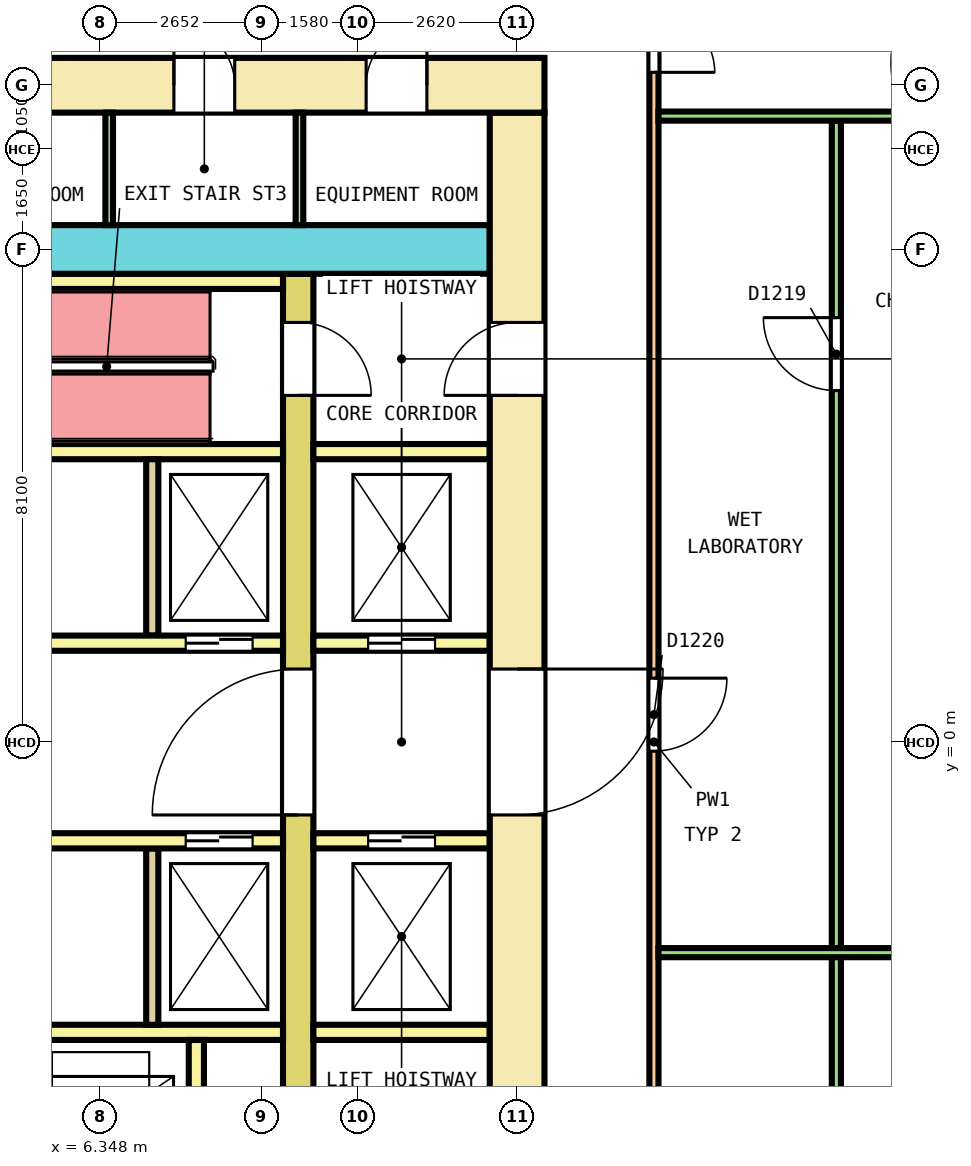
"""IFC4 building model, lengths in metres.
Left out: names, types, materials, properties, quantities, classifications, styles, units other than length and angle.
Written with IfcOpenShell. Run it as: python <this file> out.ifc"""

import sys

from ifc_helpers import new_model, si_unit, direction, frame, frame_2d, origin, place, context, subcontext, project, spatial, rectangle, extrude, element, fill, save


model = new_model("IFC4")
c1 = context("Model", 3, precision=1e-05, world=origin(), true_north=direction((0.0, 1.0)))
c2 = subcontext(c1, "Body", "Model", "MODEL_VIEW")
j1 = project(units=[si_unit("LENGTHUNIT", "METRE"), si_unit("PLANEANGLEUNIT", "RADIAN")], contexts=[c1])
p1 = place(None, origin())
s1 = spatial("IfcSite", under=j1, at=p1, CompositionType="ELEMENT")
p2 = place(p1, origin())
s2 = spatial("IfcBuilding", under=s1, at=p2, CompositionType="ELEMENT")
p3 = place(p2, frame((0.0, 0.0, 14.6)))
s3 = spatial("IfcBuildingStorey", under=s2, at=p3, CompositionType="ELEMENT", Elevation=14.6)
p4 = place(p3, frame((-13.65, 10.8, 0.0), z_axis=(0.0, 0.0, 1.0), x_axis=(1.0, 0.0, 0.0)))
e1 = element("IfcWall", 1, at=p4, inside=s3, PredefinedType="SHEAR", context=c2, shape_type="SweptSolid", body=[
    extrude(rectangle(XDim=27.3, YDim=0.9, at=frame_2d((13.65, 0.0))), origin(), (0.0, 0.0, 1.0), 4.1),
])
p5 = place(p4, frame((1.892, 0.0, 0.0)))
e2 = element("IfcOpeningElement", 2, at=p5, cuts=e1, PredefinedType="OPENING", context=c2, shape_type="SweptSolid", body=[
    extrude(rectangle(XDim=1.0, YDim=2.1, at=frame_2d((0.5, 1.05))), frame((0.0, 0.46, 0.0), z_axis=(0.0, -1.0, 0.0), x_axis=(1.0, 0.0, 0.0)), (0.0, 0.0, 1.0), 0.92),
])
p6 = place(p4, frame((4.97, 0.0, 0.0)))
e3 = element("IfcOpeningElement", 3, at=p6, cuts=e1, PredefinedType="OPENING", context=c2, shape_type="SweptSolid", body=[
    extrude(rectangle(XDim=1.0, YDim=2.1, at=frame_2d((0.5, 1.05))), frame((0.0, 0.46, 0.0), z_axis=(0.0, -1.0, 0.0), x_axis=(1.0, 0.0, 0.0)), (0.0, 0.0, 1.0), 0.92),
])
p7 = place(p4, frame((8.017, 0.0, 0.0)))
e4 = element("IfcOpeningElement", 4, at=p7, cuts=e1, PredefinedType="OPENING", context=c2, shape_type="SweptSolid", body=[
    extrude(rectangle(XDim=1.0, YDim=2.1, at=frame_2d((0.5, 1.05))), frame((0.0, 0.46, 0.0), z_axis=(0.0, -1.0, 0.0), x_axis=(1.0, 0.0, 0.0)), (0.0, 0.0, 1.0), 0.92),
])
p8 = place(p4, frame((11.064, 0.0, 0.0)))
e5 = element("IfcOpeningElement", 5, at=p8, cuts=e1, PredefinedType="OPENING", context=c2, shape_type="SweptSolid", body=[
    extrude(rectangle(XDim=1.0, YDim=2.1, at=frame_2d((0.5, 1.05))), frame((0.0, 0.46, 0.0), z_axis=(0.0, -1.0, 0.0), x_axis=(1.0, 0.0, 0.0)), (0.0, 0.0, 1.0), 0.92),
])
p9 = place(p4, frame((18.077, 0.0, 0.0)))
e6 = element("IfcOpeningElement", 6, at=p9, cuts=e1, PredefinedType="OPENING", context=c2, shape_type="SweptSolid", body=[
    extrude(rectangle(XDim=1.0, YDim=2.1, at=frame_2d((0.5, 1.05))), frame((0.0, 0.46, 0.0), z_axis=(0.0, -1.0, 0.0), x_axis=(1.0, 0.0, 0.0)), (0.0, 0.0, 1.0), 0.92),
])
p10 = place(p4, frame((21.206, 0.0, 0.0)))
e7 = element("IfcOpeningElement", 7, at=p10, cuts=e1, PredefinedType="OPENING", context=c2, shape_type="SweptSolid", body=[
    extrude(rectangle(XDim=1.0, YDim=2.1, at=frame_2d((0.5, 1.05))), frame((0.0, 0.46, 0.0), z_axis=(0.0, -1.0, 0.0), x_axis=(1.0, 0.0, 0.0)), (0.0, 0.0, 1.0), 0.92),
])
p11 = place(p4, frame((24.367, 0.0, 0.0)))
e8 = element("IfcOpeningElement", 8, at=p11, cuts=e1, PredefinedType="OPENING", context=c2, shape_type="SweptSolid", body=[
    extrude(rectangle(XDim=1.0, YDim=2.1, at=frame_2d((0.5, 1.05))), frame((0.0, 0.46, 0.0), z_axis=(0.0, -1.0, 0.0), x_axis=(1.0, 0.0, 0.0)), (0.0, 0.0, 1.0), 0.92),
])
p12 = place(p4, frame((14.575, 0.0, 0.0)))
e9 = element("IfcOpeningElement", 9, at=p12, cuts=e1, PredefinedType="OPENING", context=c2, shape_type="SweptSolid", body=[
    extrude(rectangle(XDim=1.4, YDim=2.1, at=frame_2d((0.7, 1.05))), frame((0.0, 0.46, 0.0), z_axis=(0.0, -1.0, 0.0), x_axis=(1.0, 0.0, 0.0)), (0.0, 0.0, 1.0), 0.92),
])
p13 = place(p3, frame((13.2, -10.35, 0.0), z_axis=(0.0, 0.0, 1.0), x_axis=(0.0, 1.0, 0.0)))
e10 = element("IfcWall", 10, at=p13, inside=s3, PredefinedType="SHEAR", context=c2, shape_type="SweptSolid", body=[
    extrude(rectangle(XDim=20.7, YDim=0.9, at=frame_2d((10.35, 0.0))), origin(), (0.0, 0.0, 1.0), 4.1),
])
p14 = place(p13, frame((9.15, 0.0, 0.0)))
e11 = element("IfcOpeningElement", 11, at=p14, cuts=e10, PredefinedType="OPENING", context=c2, shape_type="SweptSolid", body=[
    extrude(rectangle(XDim=2.4, YDim=2.1, at=frame_2d((1.2, 1.05))), frame((0.0, 0.46, 0.0), z_axis=(0.0, -1.0, 0.0), x_axis=(1.0, 0.0, 0.0)), (0.0, 0.0, 1.0), 0.92),
])
p15 = place(p13, frame((16.05, 0.0, 0.0)))
e12 = element("IfcOpeningElement", 12, at=p15, cuts=e10, PredefinedType="OPENING", context=c2, shape_type="SweptSolid", body=[
    extrude(rectangle(XDim=1.2, YDim=2.1, at=frame_2d((0.6, 1.05))), frame((0.0, 0.46, 0.0), z_axis=(0.0, -1.0, 0.0), x_axis=(1.0, 0.0, 0.0)), (0.0, 0.0, 1.0), 0.92),
])
p16 = place(p13, frame((3.55, 0.0, 0.0)))
e13 = element("IfcOpeningElement", 13, at=p16, cuts=e10, PredefinedType="OPENING", context=c2, shape_type="SweptSolid", body=[
    extrude(rectangle(XDim=1.0, YDim=2.1, at=frame_2d((0.5, 1.05))), frame((0.0, 0.46, 0.0), z_axis=(0.0, -1.0, 0.0), x_axis=(1.0, 0.0, 0.0)), (0.0, 0.0, 1.0), 0.92),
])
p17 = place(p3, frame((-12.75, 8.1, 0.0), z_axis=(0.0, 0.0, 1.0), x_axis=(1.0, 0.0, 0.0)))
e14 = element("IfcWall", 14, at=p17, inside=s3, PredefinedType="SHEAR", context=c2, shape_type="SweptSolid", body=[
    extrude(rectangle(XDim=25.5, YDim=0.8, at=frame_2d((12.75, 0.0))), origin(), (0.0, 0.0, 1.0), 4.1),
])
p18 = place(p17, frame((13.675, 0.0, 0.0)))
e15 = element("IfcOpeningElement", 15, at=p18, cuts=e14, PredefinedType="OPENING", context=c2, shape_type="SweptSolid", body=[
    extrude(rectangle(XDim=1.4, YDim=2.1, at=frame_2d((0.7, 1.05))), frame((0.0, 0.41, 0.0), z_axis=(0.0, -1.0, 0.0), x_axis=(1.0, 0.0, 0.0)), (0.0, 0.0, 1.0), 0.82),
])
p19 = place(p3, frame((9.6, -7.7, 0.0), z_axis=(0.0, 0.0, 1.0), x_axis=(0.0, 1.0, 0.0)))
e16 = element("IfcWall", 16, at=p19, inside=s3, PredefinedType="SHEAR", context=c2, shape_type="SweptSolid", body=[
    extrude(rectangle(XDim=15.4, YDim=0.5, at=frame_2d((7.7, 0.0))), origin(), (0.0, 0.0, 1.0), 4.1),
])
p20 = place(p19, frame((6.5, 0.0, 0.0)))
e17 = element("IfcOpeningElement", 17, at=p20, cuts=e16, PredefinedType="OPENING", context=c2, shape_type="SweptSolid", body=[
    extrude(rectangle(XDim=2.4, YDim=2.1, at=frame_2d((1.2, 1.05))), frame((0.0, 0.26, 0.0), z_axis=(0.0, -1.0, 0.0), x_axis=(1.0, 0.0, 0.0)), (0.0, 0.0, 1.0), 0.52),
])
p21 = place(p19, frame((13.4, 0.0, 0.0)))
e18 = element("IfcOpeningElement", 18, at=p21, cuts=e16, PredefinedType="OPENING", context=c2, shape_type="SweptSolid", body=[
    extrude(rectangle(XDim=1.2, YDim=2.1, at=frame_2d((0.6, 1.05))), frame((0.0, 0.26, 0.0), z_axis=(0.0, -1.0, 0.0), x_axis=(1.0, 0.0, 0.0)), (0.0, 0.0, 1.0), 0.52),
])
p22 = place(p19, frame((0.9, 0.0, 0.0)))
e19 = element("IfcOpeningElement", 19, at=p22, cuts=e16, PredefinedType="OPENING", context=c2, shape_type="SweptSolid", body=[
    extrude(rectangle(XDim=1.0, YDim=2.1, at=frame_2d((0.5, 1.05))), frame((0.0, 0.26, 0.0), z_axis=(0.0, -1.0, 0.0), x_axis=(1.0, 0.0, 0.0)), (0.0, 0.0, 1.0), 0.52),
])
p23 = place(p3, frame((-9.35, 1.625, 0.0), z_axis=(0.0, 0.0, 1.0), x_axis=(1.0, 0.0, 0.0)))
e20 = element("IfcWall", 20, at=p23, inside=s3, PredefinedType="SOLIDWALL", context=c2, shape_type="SweptSolid", body=[
    extrude(rectangle(XDim=18.7, YDim=0.25, at=frame_2d((9.35, 0.0))), origin(), (0.0, 0.0, 1.0), 4.1),
])
p24 = place(p23, frame((0.5, 0.0, 0.0)))
e21 = element("IfcOpeningElement", 21, at=p24, cuts=e20, PredefinedType="OPENING", context=c2, shape_type="SweptSolid", body=[
    extrude(rectangle(XDim=1.1, YDim=2.1, at=frame_2d((0.55, 1.05))), frame((0.0, 0.135, 0.0), z_axis=(0.0, -1.0, 0.0), x_axis=(1.0, 0.0, 0.0)), (0.0, 0.0, 1.0), 0.27),
])
p25 = place(p23, frame((17.1, 0.0, 0.0)))
e22 = element("IfcOpeningElement", 22, at=p25, cuts=e20, PredefinedType="OPENING", context=c2, shape_type="SweptSolid", body=[
    extrude(rectangle(XDim=1.1, YDim=2.1, at=frame_2d((0.55, 1.05))), frame((0.0, 0.135, 0.0), z_axis=(0.0, -1.0, 0.0), x_axis=(1.0, 0.0, 0.0)), (0.0, 0.0, 1.0), 0.27),
])
p26 = place(p3, frame((9.85, 1.625, 0.0), z_axis=(0.0, 0.0, 1.0), x_axis=(1.0, 0.0, 0.0)))
e23 = element("IfcWall", 23, at=p26, inside=s3, PredefinedType="SOLIDWALL", context=c2, shape_type="SweptSolid", body=[
    extrude(rectangle(XDim=2.9, YDim=0.25, at=frame_2d((1.45, 0.0))), origin(), (0.0, 0.0, 1.0), 4.1),
])
p27 = place(p26, frame((0.9, 0.0, 0.0)))
e24 = element("IfcOpeningElement", 24, at=p27, cuts=e23, PredefinedType="OPENING", context=c2, shape_type="SweptSolid", body=[
    extrude(rectangle(XDim=1.1, YDim=2.1, at=frame_2d((0.55, 1.05))), frame((0.0, 0.135, 0.0), z_axis=(0.0, -1.0, 0.0), x_axis=(1.0, 0.0, 0.0)), (0.0, 0.0, 1.0), 0.27),
])
p28 = place(p3, frame((-9.35, 4.775, 0.0), z_axis=(0.0, 0.0, 1.0), x_axis=(1.0, 0.0, 0.0)))
e25 = element("IfcWall", 25, at=p28, inside=s3, PredefinedType="SOLIDWALL", context=c2, shape_type="SweptSolid", body=[
    extrude(rectangle(XDim=18.7, YDim=0.25, at=frame_2d((9.35, 0.0))), origin(), (0.0, 0.0, 1.0), 4.1),
])
p29 = place(p3, frame((9.85, 4.775, 0.0), z_axis=(0.0, 0.0, 1.0), x_axis=(1.0, 0.0, 0.0)))
e26 = element("IfcWall", 26, at=p29, inside=s3, PredefinedType="SOLIDWALL", context=c2, shape_type="SweptSolid", body=[
    extrude(rectangle(XDim=2.9, YDim=0.25, at=frame_2d((1.45, 0.0))), origin(), (0.0, 0.0, 1.0), 4.1),
])
p30 = place(p3, frame((7.2, 1.75, 0.0), z_axis=(0.0, 0.0, 1.0), x_axis=(0.0, 1.0, 0.0)))
e27 = element("IfcWall", 27, at=p30, inside=s3, PredefinedType="SOLIDWALL", context=c2, shape_type="SweptSolid", body=[
    extrude(rectangle(XDim=2.9, YDim=0.2, at=frame_2d((1.45, 0.0))), origin(), (0.0, 0.0, 1.0), 4.1),
])
p31 = place(p3, frame((-9.35, -1.625, 0.0), z_axis=(0.0, 0.0, 1.0), x_axis=(1.0, 0.0, 0.0)))
e28 = element("IfcWall", 28, at=p31, inside=s3, PredefinedType="SOLIDWALL", context=c2, shape_type="SweptSolid", body=[
    extrude(rectangle(XDim=18.7, YDim=0.25, at=frame_2d((9.35, 0.0))), origin(), (0.0, 0.0, 1.0), 4.1),
])
p32 = place(p31, frame((0.5, 0.0, 0.0)))
e29 = element("IfcOpeningElement", 29, at=p32, cuts=e28, PredefinedType="OPENING", context=c2, shape_type="SweptSolid", body=[
    extrude(rectangle(XDim=1.1, YDim=2.1, at=frame_2d((0.55, 1.05))), frame((0.0, 0.135, 0.0), z_axis=(0.0, -1.0, 0.0), x_axis=(1.0, 0.0, 0.0)), (0.0, 0.0, 1.0), 0.27),
])
p33 = place(p31, frame((17.1, 0.0, 0.0)))
e30 = element("IfcOpeningElement", 30, at=p33, cuts=e28, PredefinedType="OPENING", context=c2, shape_type="SweptSolid", body=[
    extrude(rectangle(XDim=1.1, YDim=2.1, at=frame_2d((0.55, 1.05))), frame((0.0, 0.135, 0.0), z_axis=(0.0, -1.0, 0.0), x_axis=(1.0, 0.0, 0.0)), (0.0, 0.0, 1.0), 0.27),
])
p34 = place(p3, frame((9.85, -1.625, 0.0), z_axis=(0.0, 0.0, 1.0), x_axis=(1.0, 0.0, 0.0)))
e31 = element("IfcWall", 31, at=p34, inside=s3, PredefinedType="SOLIDWALL", context=c2, shape_type="SweptSolid", body=[
    extrude(rectangle(XDim=2.9, YDim=0.25, at=frame_2d((1.45, 0.0))), origin(), (0.0, 0.0, 1.0), 4.1),
])
p35 = place(p34, frame((0.9, 0.0, 0.0)))
e32 = element("IfcOpeningElement", 32, at=p35, cuts=e31, PredefinedType="OPENING", context=c2, shape_type="SweptSolid", body=[
    extrude(rectangle(XDim=1.1, YDim=2.1, at=frame_2d((0.55, 1.05))), frame((0.0, 0.135, 0.0), z_axis=(0.0, -1.0, 0.0), x_axis=(1.0, 0.0, 0.0)), (0.0, 0.0, 1.0), 0.27),
])
p36 = place(p3, frame((-9.35, -4.775, 0.0), z_axis=(0.0, 0.0, 1.0), x_axis=(1.0, 0.0, 0.0)))
e33 = element("IfcWall", 33, at=p36, inside=s3, PredefinedType="SOLIDWALL", context=c2, shape_type="SweptSolid", body=[
    extrude(rectangle(XDim=18.7, YDim=0.25, at=frame_2d((9.35, 0.0))), origin(), (0.0, 0.0, 1.0), 4.1),
])
p37 = place(p3, frame((9.85, -4.775, 0.0), z_axis=(0.0, 0.0, 1.0), x_axis=(1.0, 0.0, 0.0)))
e34 = element("IfcWall", 34, at=p37, inside=s3, PredefinedType="SOLIDWALL", context=c2, shape_type="SweptSolid", body=[
    extrude(rectangle(XDim=2.9, YDim=0.25, at=frame_2d((1.45, 0.0))), origin(), (0.0, 0.0, 1.0), 4.1),
])
p38 = place(p3, frame((7.2, -4.65, 0.0), z_axis=(0.0, 0.0, 1.0), x_axis=(0.0, 1.0, 0.0)))
e35 = element("IfcWall", 35, at=p38, inside=s3, PredefinedType="SOLIDWALL", context=c2, shape_type="SweptSolid", body=[
    extrude(rectangle(XDim=2.9, YDim=0.2, at=frame_2d((1.45, 0.0))), origin(), (0.0, 0.0, 1.0), 4.1),
])
p39 = place(p3, frame((3.55, 7.575, 0.0), z_axis=(0.0, 0.0, 1.0), x_axis=(1.0, 0.0, 0.0)))
e36 = element("IfcWall", 36, at=p39, inside=s3, PredefinedType="SOLIDWALL", context=c2, shape_type="SweptSolid", body=[
    extrude(rectangle(XDim=5.8, YDim=0.25, at=frame_2d((2.9, 0.0))), origin(), (0.0, 0.0, 1.0), 4.1),
])
p40 = place(p3, frame((7.925, -7.7, 0.0), z_axis=(0.0, 0.0, 1.0), x_axis=(0.0, 1.0, 0.0)))
e37 = element("IfcWall", 37, at=p40, inside=s3, PredefinedType="SOLIDWALL", context=c2, shape_type="SweptSolid", body=[
    extrude(rectangle(XDim=2.8, YDim=0.25, at=frame_2d((1.4, 0.0))), origin(), (0.0, 0.0, 1.0), 4.1),
])
for number, where, z_axis, x_axis in (
    (38, (6.492, 8.5, 0.0), (0.0, 0.0, 1.0), (0.0, 1.0, 0.0)),
    (39, (9.621, 8.5, 0.0), (0.0, 0.0, 1.0), (0.0, 1.0, 0.0)),
):
    element("IfcWall", number, at=place(p3, frame(where, z_axis=z_axis, x_axis=x_axis)), inside=s3, PredefinedType="PARTITIONING", context=c2, shape_type="SweptSolid", body=[
        extrude(rectangle(XDim=1.85, YDim=0.125, at=frame_2d((0.925, 0.0))), origin(), (0.0, 0.0, 1.0), 4.1),
    ])
p41 = place(p3, frame((15.45, -12.975, 0.0), z_axis=(0.0, 0.0, 1.0), x_axis=(0.0, 1.0, 0.0)))
e40 = element("IfcWall", 40, at=p41, inside=s3, PredefinedType="PARTITIONING", context=c2, shape_type="SweptSolid", body=[
    extrude(rectangle(XDim=25.95, YDim=0.15, at=frame_2d((12.975, 0.0))), origin(), (0.0, 0.0, 1.0), 3.05),
])
p42 = place(p41, frame((12.825, 0.0, 0.0)))
e41 = element("IfcOpeningElement", 41, at=p42, cuts=e40, PredefinedType="OPENING", context=c2, shape_type="SweptSolid", body=[
    extrude(rectangle(XDim=1.2, YDim=2.1, at=frame_2d((0.6, 1.05))), frame((0.0, 0.085, 0.0), z_axis=(0.0, -1.0, 0.0), x_axis=(1.0, 0.0, 0.0)), (0.0, 0.0, 1.0), 0.17),
])
p43 = place(p41, frame((23.988, 0.0, 0.0)))
e42 = element("IfcOpeningElement", 42, at=p43, cuts=e40, PredefinedType="OPENING", context=c2, shape_type="SweptSolid", body=[
    extrude(rectangle(XDim=1.0, YDim=2.1, at=frame_2d((0.5, 1.05))), frame((0.0, 0.085, 0.0), z_axis=(0.0, -1.0, 0.0), x_axis=(1.0, 0.0, 0.0)), (0.0, 0.0, 1.0), 0.17),
])
p44 = place(p41, frame((4.218, 0.0, 0.0)))
e43 = element("IfcOpeningElement", 43, at=p44, cuts=e40, PredefinedType="OPENING", context=c2, shape_type="SweptSolid", body=[
    extrude(rectangle(XDim=1.0, YDim=2.1, at=frame_2d((0.5, 1.05))), frame((0.0, 0.085, 0.0), z_axis=(0.0, -1.0, 0.0), x_axis=(1.0, 0.0, 0.0)), (0.0, 0.0, 1.0), 0.17),
])
p45 = place(p3, frame((18.45, -13.428, 0.0), z_axis=(0.0, 0.0, 1.0), x_axis=(0.0, 1.0, 0.0)))
e44 = element("IfcWall", 44, at=p45, inside=s3, PredefinedType="PARTITIONING", context=c2, shape_type="SweptSolid", body=[
    extrude(rectangle(XDim=23.646, YDim=0.15, at=frame_2d((11.823, 0.0))), origin(), (0.0, 0.0, 1.0), 3.05),
])
p46 = place(p45, frame((19.207, 0.0, 0.0)))
e45 = element("IfcOpeningElement", 45, at=p46, cuts=e44, PredefinedType="OPENING", context=c2, shape_type="SweptSolid", body=[
    extrude(rectangle(XDim=1.2, YDim=2.1, at=frame_2d((0.6, 1.05))), frame((0.0, 0.085, 0.0), z_axis=(0.0, -1.0, 0.0), x_axis=(1.0, 0.0, 0.0)), (0.0, 0.0, 1.0), 0.17),
])
p47 = place(p45, frame((5.565, 0.0, 0.0)))
e46 = element("IfcOpeningElement", 46, at=p47, cuts=e44, PredefinedType="OPENING", context=c2, shape_type="SweptSolid", body=[
    extrude(rectangle(XDim=1.2, YDim=2.1, at=frame_2d((0.6, 1.05))), frame((0.0, 0.085, 0.0), z_axis=(0.0, -1.0, 0.0), x_axis=(1.0, 0.0, 0.0)), (0.0, 0.0, 1.0), 0.17),
])
p48 = place(p3, frame((15.525, 10.293, 0.0), z_axis=(0.0, 0.0, 1.0), x_axis=(1.0, 0.0, 0.0)))
e47 = element("IfcWall", 47, at=p48, inside=s3, PredefinedType="PARTITIONING", context=c2, shape_type="SweptSolid", body=[
    extrude(rectangle(XDim=6.014, YDim=0.15, at=frame_2d((3.007, 0.0))), origin(), (0.0, 0.0, 1.0), 3.05),
])
p49 = place(p3, frame((15.525, -3.464, 0.0), z_axis=(0.0, 0.0, 1.0), x_axis=(1.0, 0.0, 0.0)))
e48 = element("IfcWall", 48, at=p49, inside=s3, PredefinedType="PARTITIONING", context=c2, shape_type="SweptSolid", body=[
    extrude(rectangle(XDim=9.957, YDim=0.15, at=frame_2d((4.979, 0.0))), origin(), (0.0, 0.0, 1.0), 3.05),
])
p50 = place(p25, origin())
e49 = element("IfcDoor", 49, at=p50, inside=s3, OperationType="DOUBLE_DOOR_SLIDING", PredefinedType="DOOR", context=c2, shape_type="SweptSolid", body=[
    extrude(rectangle(XDim=1.1, YDim=2.1, at=frame_2d((0.55, 1.05))), frame((0.0, 0.075, 0.0), z_axis=(0.0, -1.0, 0.0), x_axis=(1.0, 0.0, 0.0)), (0.0, 0.0, 1.0), 0.15),
])
fill(e22, e49)
p51 = place(p27, origin())
e50 = element("IfcDoor", 50, at=p51, inside=s3, OperationType="DOUBLE_DOOR_SLIDING", PredefinedType="DOOR", context=c2, shape_type="SweptSolid", body=[
    extrude(rectangle(XDim=1.1, YDim=2.1, at=frame_2d((0.55, 1.05))), frame((0.0, 0.075, 0.0), z_axis=(0.0, -1.0, 0.0), x_axis=(1.0, 0.0, 0.0)), (0.0, 0.0, 1.0), 0.15),
])
fill(e24, e50)
p52 = place(p33, origin())
e51 = element("IfcDoor", 51, at=p52, inside=s3, OperationType="DOUBLE_DOOR_SLIDING", PredefinedType="DOOR", context=c2, shape_type="SweptSolid", body=[
    extrude(rectangle(XDim=1.1, YDim=2.1, at=frame_2d((0.55, 1.05))), frame((0.0, 0.075, 0.0), z_axis=(0.0, -1.0, 0.0), x_axis=(1.0, 0.0, 0.0)), (0.0, 0.0, 1.0), 0.15),
])
fill(e30, e51)
p53 = place(p35, origin())
e52 = element("IfcDoor", 52, at=p53, inside=s3, OperationType="DOUBLE_DOOR_SLIDING", PredefinedType="DOOR", context=c2, shape_type="SweptSolid", body=[
    extrude(rectangle(XDim=1.1, YDim=2.1, at=frame_2d((0.55, 1.05))), frame((0.0, 0.075, 0.0), z_axis=(0.0, -1.0, 0.0), x_axis=(1.0, 0.0, 0.0)), (0.0, 0.0, 1.0), 0.15),
])
fill(e32, e52)
p54 = place(p20, origin())
e53 = element("IfcDoor", 53, at=p54, inside=s3, OperationType="DOUBLE_DOOR_SINGLE_SWING", PredefinedType="DOOR", context=c2, shape_type="SweptSolid", body=[
    extrude(rectangle(XDim=2.4, YDim=2.1, at=frame_2d((1.2, 1.05))), frame((0.0, 0.2, 0.0), z_axis=(0.0, -1.0, 0.0), x_axis=(1.0, 0.0, 0.0)), (0.0, 0.0, 1.0), 0.4),
])
fill(e17, e53)
p55 = place(p14, origin())
e54 = element("IfcDoor", 54, at=p55, inside=s3, OperationType="DOUBLE_DOOR_SINGLE_SWING", PredefinedType="DOOR", context=c2, shape_type="SweptSolid", body=[
    extrude(rectangle(XDim=2.4, YDim=2.1, at=frame_2d((1.2, 1.05))), frame((0.0, 0.3, 0.0), z_axis=(0.0, -1.0, 0.0), x_axis=(1.0, 0.0, 0.0)), (0.0, 0.0, 1.0), 0.6),
])
fill(e11, e54)
p56 = place(p21, origin())
e55 = element("IfcDoor", 55, at=p56, inside=s3, OperationType="SINGLE_SWING_LEFT", PredefinedType="DOOR", context=c2, shape_type="SweptSolid", body=[
    extrude(rectangle(XDim=1.2, YDim=2.1, at=frame_2d((0.6, 1.05))), frame((0.0, 0.2, 0.0), z_axis=(0.0, -1.0, 0.0), x_axis=(1.0, 0.0, 0.0)), (0.0, 0.0, 1.0), 0.4),
])
fill(e18, e55)
p57 = place(p15, origin())
e56 = element("IfcDoor", 56, at=p57, inside=s3, OperationType="SINGLE_SWING_RIGHT", PredefinedType="DOOR", context=c2, shape_type="SweptSolid", body=[
    extrude(rectangle(XDim=1.2, YDim=2.1, at=frame_2d((0.6, 1.05))), frame((0.0, 0.3, 0.0), z_axis=(0.0, -1.0, 0.0), x_axis=(1.0, 0.0, 0.0)), (0.0, 0.0, 1.0), 0.6),
])
fill(e12, e56)
p58 = place(p10, origin())
e57 = element("IfcDoor", 57, at=p58, inside=s3, OperationType="SINGLE_SWING_RIGHT", PredefinedType="DOOR", context=c2, shape_type="SweptSolid", body=[
    extrude(rectangle(XDim=1.0, YDim=2.1, at=frame_2d((0.5, 1.05))), frame((0.0, 0.3, 0.0), z_axis=(0.0, -1.0, 0.0), x_axis=(1.0, 0.0, 0.0)), (0.0, 0.0, 1.0), 0.6),
])
fill(e7, e57)
p59 = place(p11, origin())
e58 = element("IfcDoor", 58, at=p59, inside=s3, OperationType="SINGLE_SWING_LEFT", PredefinedType="DOOR", context=c2, shape_type="SweptSolid", body=[
    extrude(rectangle(XDim=1.0, YDim=2.1, at=frame_2d((0.5, 1.05))), frame((0.0, 0.3, 0.0), z_axis=(0.0, -1.0, 0.0), x_axis=(1.0, 0.0, 0.0)), (0.0, 0.0, 1.0), 0.6),
])
fill(e8, e58)
p60 = place(p46, origin())
e59 = element("IfcDoor", 59, at=p60, inside=s3, OperationType="DOUBLE_DOOR_SINGLE_SWING", PredefinedType="DOOR", context=c2, shape_type="SweptSolid", body=[
    extrude(rectangle(XDim=1.2, YDim=2.1, at=frame_2d((0.6, 1.05))), frame((0.0, 0.025, 0.0), z_axis=(0.0, -1.0, 0.0), x_axis=(1.0, 0.0, 0.0)), (0.0, 0.0, 1.0), 0.05),
])
fill(e45, e59)
p61 = place(p42, origin())
e60 = element("IfcDoor", 60, at=p61, inside=s3, OperationType="DOUBLE_DOOR_SINGLE_SWING", PredefinedType="DOOR", context=c2, shape_type="SweptSolid", body=[
    extrude(rectangle(XDim=1.2, YDim=2.1, at=frame_2d((0.6, 1.05))), frame((0.0, 0.025, 0.0), z_axis=(0.0, -1.0, 0.0), x_axis=(1.0, 0.0, 0.0)), (0.0, 0.0, 1.0), 0.05),
])
fill(e41, e60)
p62 = place(p43, origin())
e61 = element("IfcDoor", 61, at=p62, inside=s3, OperationType="SINGLE_SWING_RIGHT", PredefinedType="DOOR", context=c2, shape_type="SweptSolid", body=[
    extrude(rectangle(XDim=1.0, YDim=2.1, at=frame_2d((0.5, 1.05))), frame((0.0, 0.025, 0.0), z_axis=(0.0, -1.0, 0.0), x_axis=(1.0, 0.0, 0.0)), (0.0, 0.0, 1.0), 0.05),
])
fill(e42, e61)
save(model, sys.argv[1])
